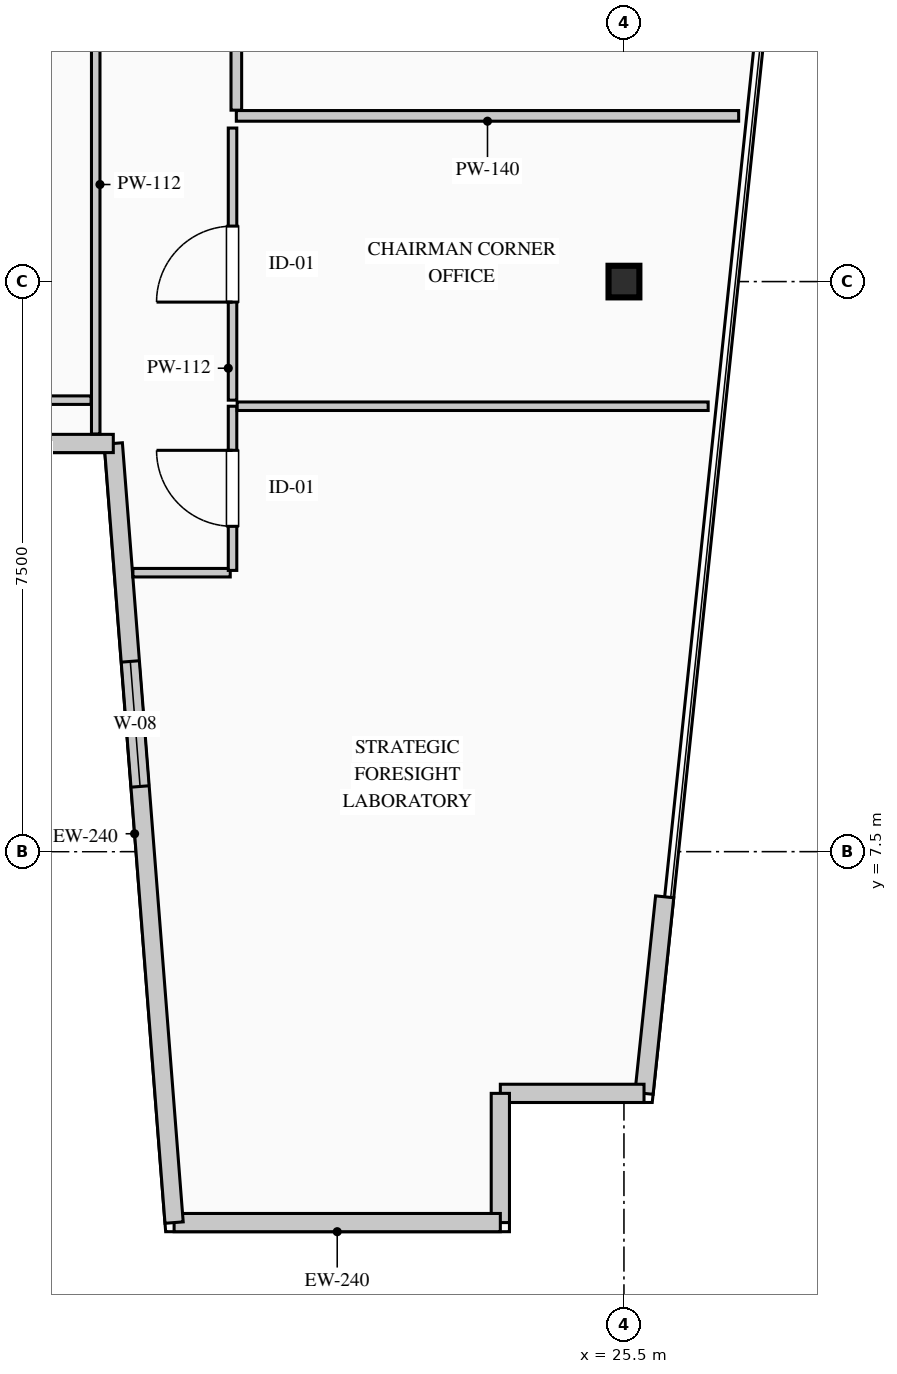
"""IFC4 building model, lengths in metres.
Left out: names, types, materials, properties, quantities, classifications, styles, units other than length and angle.
Written with IfcOpenShell. Run it as: python <this file> out.ifc"""

import sys

from ifc_helpers import new_model, si_unit, direction, frame, frame_2d, origin, origin_2d, place, context, subcontext, project, spatial, rectangle, i_section, extrude, element, fill, save


model = new_model("IFC4")
c1 = context("Model", 3, precision=1e-05, world=origin(), true_north=direction((0.0, 1.0)))
c2 = subcontext(c1, "Body", "Model", "MODEL_VIEW")
j1 = project(units=[si_unit("LENGTHUNIT", "METRE"), si_unit("PLANEANGLEUNIT", "RADIAN")], contexts=[c1])
p1 = place(None, origin())
s1 = spatial("IfcSite", under=j1, at=p1, CompositionType="ELEMENT")
p2 = place(p1, origin())
s2 = spatial("IfcBuilding", under=s1, at=p2, CompositionType="ELEMENT")
p3 = place(p2, frame((0.0, 0.0, 280.4)))
s3 = spatial("IfcBuildingStorey", under=s2, at=p3, CompositionType="ELEMENT", Elevation=280.4)
p4 = place(p3, frame((25.5, 15.0, 0.0), z_axis=(0.0, 0.0, 1.0), x_axis=(1.0, 0.0, 0.0)))
e1 = element("IfcColumn", 1, at=p4, inside=s3, PredefinedType="COLUMN", context=c2, shape_type="SweptSolid", body=[
    extrude(i_section(OverallWidth=0.406, OverallDepth=0.416, WebThickness=0.03, FlangeThickness=0.048, FilletRadius=0.015, at=origin_2d()), origin(), (0.0, 0.0, 1.0), 3.95),
])
p5 = place(p3, frame((26.036, 6.906, 0.0), z_axis=(0.0, 0.0, 1.0), x_axis=(-0.104513699976, -0.994523446942, 0.0)))
e2 = element("IfcWall", 2, at=p5, inside=s3, PredefinedType="STANDARD", context=c2, shape_type="SweptSolid", body=[
    extrude(rectangle(XDim=2.6, YDim=0.24, at=frame_2d((1.3, 0.0))), origin(), (0.0, 0.0, 1.0), 3.7),
])
p6 = place(p3, frame((25.764, 4.32, 0.0), z_axis=(0.0, 0.0, 1.0), x_axis=(-1.0, 0.0, 0.0)))
e3 = element("IfcWall", 3, at=p6, inside=s3, PredefinedType="STANDARD", context=c2, shape_type="SweptSolid", body=[
    extrude(rectangle(XDim=1.89, YDim=0.24, at=frame_2d((0.945, 0.0))), origin(), (0.0, 0.0, 1.0), 3.7),
])
p7 = place(p3, frame((23.874, 4.32, 0.0), z_axis=(0.0, 0.0, 1.0), x_axis=(0.0, -1.0, 0.0)))
e4 = element("IfcWall", 4, at=p7, inside=s3, PredefinedType="STANDARD", context=c2, shape_type="SweptSolid", body=[
    extrude(rectangle(XDim=1.7, YDim=0.24, at=frame_2d((0.85, 0.0))), origin(), (0.0, 0.0, 1.0), 3.7),
])
p8 = place(p3, frame((23.874, 2.62, 0.0), z_axis=(0.0, 0.0, 1.0), x_axis=(-1.0, 0.0, 0.0)))
e5 = element("IfcWall", 5, at=p8, inside=s3, PredefinedType="STANDARD", context=c2, shape_type="SweptSolid", body=[
    extrude(rectangle(XDim=4.292, YDim=0.24, at=frame_2d((2.146, 0.0))), origin(), (0.0, 0.0, 1.0), 3.7),
])
p9 = place(p3, frame((19.581, 2.62, 0.0), z_axis=(0.0, 0.0, 1.0), x_axis=(-0.077816860153, 0.996967670627, 0.0)))
e6 = element("IfcWall", 6, at=p9, inside=s3, PredefinedType="STANDARD", context=c2, shape_type="SweptSolid", body=[
    extrude(rectangle(XDim=10.281, YDim=0.24, at=frame_2d((5.141, 0.0))), origin(), (0.0, 0.0, 1.0), 3.7),
])
p10 = place(p9, frame((5.755, 0.0, 0.9)))
e7 = element("IfcOpeningElement", 7, at=p10, cuts=e6, PredefinedType="OPENING", context=c2, shape_type="SweptSolid", body=[
    extrude(rectangle(XDim=1.65, YDim=1.95, at=frame_2d((0.825, 0.975))), frame((0.0, 0.13, 0.0), z_axis=(0.0, -1.0, 0.0), x_axis=(1.0, 0.0, 0.0)), (0.0, 0.0, 1.0), 0.26),
])
p11 = place(p3, frame((18.781, 12.87, 0.0), z_axis=(0.0, 0.0, 1.0), x_axis=(-1.0, 0.0, 0.0)))
e8 = element("IfcWall", 8, at=p11, inside=s3, PredefinedType="STANDARD", context=c2, shape_type="SweptSolid", body=[
    extrude(rectangle(XDim=3.641, YDim=0.24, at=frame_2d((1.82, 0.0))), origin(), (0.0, 0.0, 1.0), 3.7),
])
p12 = place(p3, frame((27.009, 17.18, 0.0), z_axis=(0.0, 0.0, 1.0), x_axis=(-1.0, 0.0, 0.0)))
e9 = element("IfcWall", 9, at=p12, inside=s3, PredefinedType="PARTITIONING", context=c2, shape_type="SweptSolid", body=[
    extrude(rectangle(XDim=6.609, YDim=0.14, at=frame_2d((3.305, 0.0))), origin(), (0.0, 0.0, 1.0), 3.7),
])
p13 = place(p3, frame((20.4, 17.255, 0.0), z_axis=(0.0, 0.0, 1.0), x_axis=(0.0, 1.0, 0.0)))
e10 = element("IfcWall", 10, at=p13, inside=s3, PredefinedType="PARTITIONING", context=c2, shape_type="SweptSolid", body=[
    extrude(rectangle(XDim=3.995, YDim=0.14, at=frame_2d((1.998, 0.0))), origin(), (0.0, 0.0, 1.0), 3.7),
])
p14 = place(p13, frame((1.522, 0.0, 0.0)))
e11 = element("IfcOpeningElement", 11, at=p14, cuts=e10, PredefinedType="OPENING", context=c2, shape_type="SweptSolid", body=[
    extrude(rectangle(XDim=0.95, YDim=2.15, at=frame_2d((0.475, 1.075))), frame((0.0, 0.08, 0.0), z_axis=(0.0, -1.0, 0.0), x_axis=(1.0, 0.0, 0.0)), (0.0, 0.0, 1.0), 0.16),
])
p15 = place(p3, frame((19.039, 11.17, 0.0), z_axis=(0.0, 0.0, 1.0), x_axis=(1.0, 0.0, 0.0)))
e12 = element("IfcWall", 12, at=p15, inside=s3, PredefinedType="PARTITIONING", context=c2, shape_type="SweptSolid", body=[
    extrude(rectangle(XDim=1.281, YDim=0.112, at=frame_2d((0.64, 0.0))), origin(), (0.0, 0.0, 1.0), 3.7),
])
p16 = place(p3, frame((20.35, 11.2, 0.0), z_axis=(0.0, 0.0, 1.0), x_axis=(0.0, 1.0, 0.0)))
e13 = element("IfcWall", 13, at=p16, inside=s3, PredefinedType="PARTITIONING", context=c2, shape_type="SweptSolid", body=[
    extrude(rectangle(XDim=2.16, YDim=0.112, at=frame_2d((1.08, 0.0))), origin(), (0.0, 0.0, 1.0), 3.7),
])
p17 = place(p16, frame((0.58, 0.0, 0.0)))
e14 = element("IfcOpeningElement", 14, at=p17, cuts=e13, PredefinedType="OPENING", context=c2, shape_type="SweptSolid", body=[
    extrude(rectangle(XDim=1.0, YDim=2.15, at=frame_2d((0.5, 1.075))), frame((0.0, 0.066, 0.0), z_axis=(0.0, -1.0, 0.0), x_axis=(1.0, 0.0, 0.0)), (0.0, 0.0, 1.0), 0.132),
])
p18 = place(p3, frame((20.411, 13.36, 0.0), z_axis=(0.0, 0.0, 1.0), x_axis=(1.0, 0.0, 0.0)))
e15 = element("IfcWall", 15, at=p18, inside=s3, PredefinedType="PARTITIONING", context=c2, shape_type="SweptSolid", body=[
    extrude(rectangle(XDim=6.197, YDim=0.112, at=frame_2d((3.099, 0.0))), origin(), (0.0, 0.0, 1.0), 3.7),
])
p19 = place(p3, frame((20.35, 13.44, 0.0), z_axis=(0.0, 0.0, 1.0), x_axis=(0.0, 1.0, 0.0)))
e16 = element("IfcWall", 16, at=p19, inside=s3, PredefinedType="PARTITIONING", context=c2, shape_type="SweptSolid", body=[
    extrude(rectangle(XDim=3.58, YDim=0.112, at=frame_2d((1.79, 0.0))), origin(), (0.0, 0.0, 1.0), 3.7),
])
p20 = place(p19, frame((1.29, 0.0, 0.0)))
e17 = element("IfcOpeningElement", 17, at=p20, cuts=e16, PredefinedType="OPENING", context=c2, shape_type="SweptSolid", body=[
    extrude(rectangle(XDim=1.0, YDim=2.15, at=frame_2d((0.5, 1.075))), frame((0.0, 0.066, 0.0), z_axis=(0.0, -1.0, 0.0), x_axis=(1.0, 0.0, 0.0)), (0.0, 0.0, 1.0), 0.132),
])
p21 = place(p3, frame((18.55, 19.559, 0.0), z_axis=(0.0, 0.0, 1.0), x_axis=(0.0, -1.0, 0.0)))
e18 = element("IfcWall", 18, at=p21, inside=s3, PredefinedType="PARTITIONING", context=c2, shape_type="SweptSolid", body=[
    extrude(rectangle(XDim=6.564, YDim=0.112, at=frame_2d((3.282, 0.0))), origin(), (0.0, 0.0, 1.0), 3.7),
])
p22 = place(p3, frame((18.489, 13.44, 0.0), z_axis=(0.0, 0.0, 1.0), x_axis=(-1.0, 0.0, 0.0)))
e19 = element("IfcWall", 19, at=p22, inside=s3, PredefinedType="PARTITIONING", context=c2, shape_type="SweptSolid", body=[
    extrude(rectangle(XDim=2.474, YDim=0.112, at=frame_2d((1.237, 0.0))), origin(), (0.0, 0.0, 1.0), 3.7),
])
p23 = place(p10, origin())
e20 = element("IfcWindow", 20, at=p23, inside=s3, PartitioningType="SINGLE_PANEL", PredefinedType="WINDOW", context=c2, shape_type="SweptSolid", body=[
    extrude(rectangle(XDim=1.65, YDim=1.95, at=frame_2d((0.825, 0.975))), frame((0.0, 0.03, 0.0), z_axis=(0.0, -1.0, 0.0), x_axis=(1.0, 0.0, 0.0)), (0.0, 0.0, 1.0), 0.06),
])
fill(e7, e20)
p24 = place(p17, origin())
e21 = element("IfcDoor", 21, at=p24, inside=s3, OperationType="SINGLE_SWING_RIGHT", PredefinedType="DOOR", context=c2, shape_type="SweptSolid", body=[
    extrude(rectangle(XDim=1.0, YDim=2.15, at=frame_2d((0.5, 1.075))), frame((0.0, 0.025, 0.0), z_axis=(0.0, -1.0, 0.0), x_axis=(1.0, 0.0, 0.0)), (0.0, 0.0, 1.0), 0.05),
])
fill(e14, e21)
p25 = place(p20, origin())
e22 = element("IfcDoor", 22, at=p25, inside=s3, OperationType="SINGLE_SWING_LEFT", PredefinedType="DOOR", context=c2, shape_type="SweptSolid", body=[
    extrude(rectangle(XDim=1.0, YDim=2.15, at=frame_2d((0.5, 1.075))), frame((0.0, 0.025, 0.0), z_axis=(0.0, -1.0, 0.0), x_axis=(1.0, 0.0, 0.0)), (0.0, 0.0, 1.0), 0.05),
])
fill(e17, e22)
save(model, sys.argv[1])
